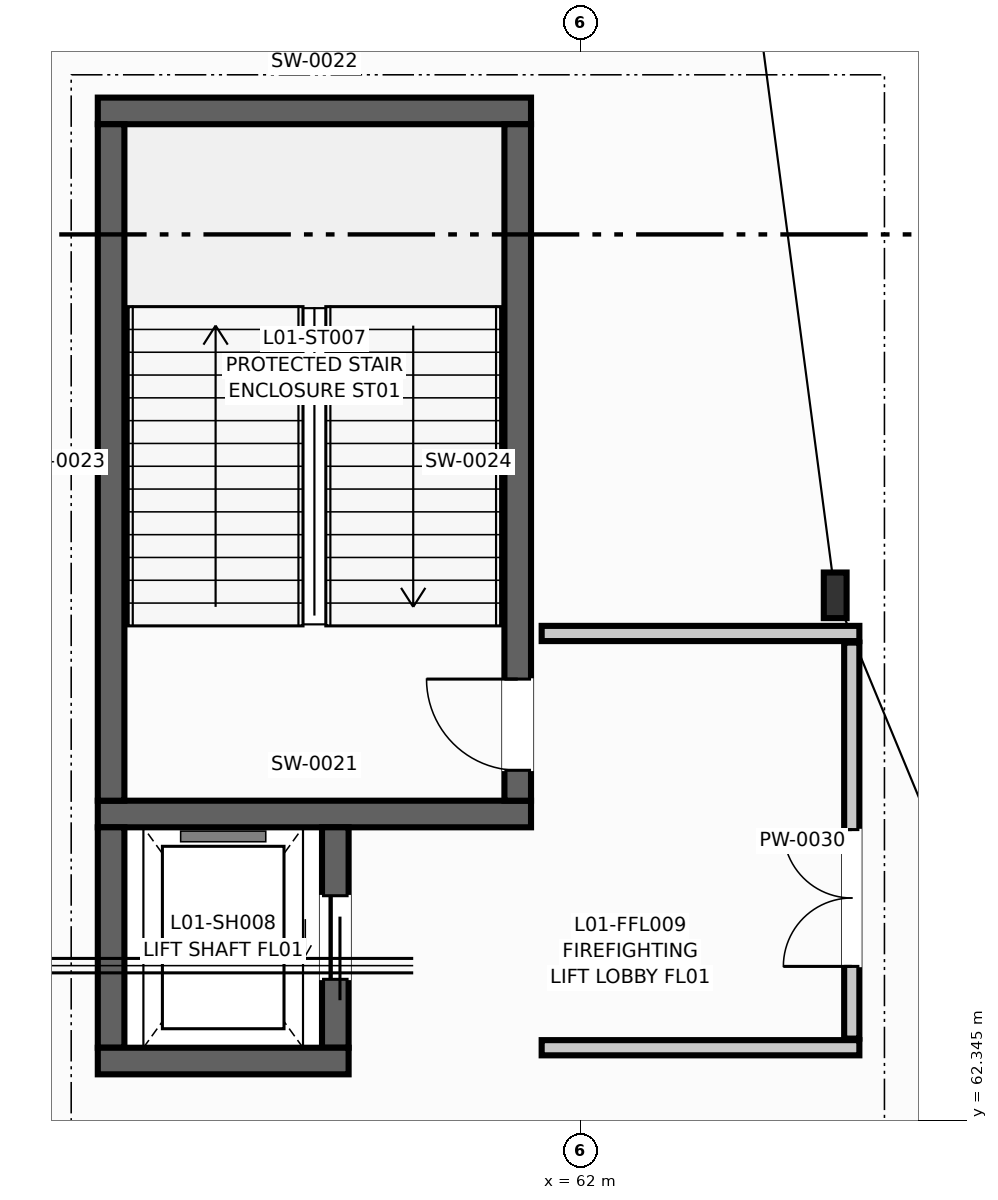
"""IFC4 building model, lengths in metres.
Left out: names, types, materials, properties, quantities, classifications, styles, units other than length and angle.
Written with IfcOpenShell. Run it as: python <this file> out.ifc"""

import sys

from ifc_helpers import new_model, si_unit, direction, frame, frame_2d, origin, origin_2d, place, context, subcontext, project, spatial, rectangle, i_section, extrude, element, fill, save


model = new_model("IFC4")
c1 = context("Model", 3, precision=1e-05, world=origin(), true_north=direction((0.0, 1.0)))
c2 = subcontext(c1, "Body", "Model", "MODEL_VIEW")
j1 = project(units=[si_unit("LENGTHUNIT", "METRE"), si_unit("PLANEANGLEUNIT", "RADIAN")], contexts=[c1])
p1 = place(None, origin())
s1 = spatial("IfcSite", under=j1, at=p1, CompositionType="ELEMENT")
p2 = place(p1, origin())
s2 = spatial("IfcBuilding", under=s1, at=p2, CompositionType="ELEMENT")
p3 = place(p2, frame((0.0, 0.0, 4.5)))
s3 = spatial("IfcBuildingStorey", under=s2, at=p3, CompositionType="ELEMENT", Elevation=4.5)
p4 = place(p3, frame((65.352, 69.252, 0.0), z_axis=(0.0, 0.0, 1.0), x_axis=(1.0, 0.0, 0.0)))
e1 = element("IfcColumn", 1, at=p4, inside=s3, PredefinedType="COLUMN", context=c2, shape_type="SweptSolid", body=[
    extrude(i_section(OverallWidth=0.3, OverallDepth=0.6, WebThickness=0.015, FlangeThickness=0.03, at=origin_2d()), origin(), (0.0, 0.0, 1.0), 4.5),
])
p5 = place(p3, frame((51.686, 65.457, 0.0), z_axis=(0.0, 0.0, 1.0), x_axis=(0.382625334652, -0.923903595232, 0.0)))
e2 = element("IfcWall", 2, at=p5, inside=s3, PredefinedType="SOLIDWALL", context=c2, shape_type="SweptSolid", body=[
    extrude(rectangle(XDim=12.271, YDim=0.28, at=frame_2d((6.135, 0.0))), origin(), (0.0, 0.0, 1.0), 3.1),
])
p6 = place(p5, frame((5.235, 0.0, 0.0)))
e3 = element("IfcOpeningElement", 3, at=p6, cuts=e2, PredefinedType="OPENING", context=c2, shape_type="SweptSolid", body=[
    extrude(rectangle(XDim=1.8, YDim=2.35, at=frame_2d((0.9, 1.175))), frame((0.0, 0.15, 0.0), z_axis=(0.0, -1.0, 0.0), x_axis=(1.0, 0.0, 0.0)), (0.0, 0.0, 1.0), 0.3),
])
for number, where, z_axis, x_axis in (
    (4, (55.65, 66.375, 0.0), (0.0, 0.0, 1.0), (1.0, 0.0, 0.0)),
    (5, (55.65, 75.625, 0.0), (0.0, 0.0, 1.0), (1.0, 0.0, 0.0)),
):
    element("IfcWall", number, at=place(p3, frame(where, z_axis=z_axis, x_axis=x_axis)), inside=s3, PredefinedType="SHEAR", context=c2, shape_type="SweptSolid", body=[
        extrude(rectangle(XDim=5.7, YDim=0.35, at=frame_2d((2.85, 0.0))), origin(), (0.0, 0.0, 1.0), 4.25),
    ])
p7 = place(p3, frame((55.825, 66.55, 0.0), z_axis=(0.0, 0.0, 1.0), x_axis=(0.0, 1.0, 0.0)))
e6 = element("IfcWall", 6, at=p7, inside=s3, PredefinedType="SHEAR", context=c2, shape_type="SweptSolid", body=[
    extrude(rectangle(XDim=8.9, YDim=0.35, at=frame_2d((4.45, 0.0))), origin(), (0.0, 0.0, 1.0), 4.25),
])
p8 = place(p3, frame((61.175, 66.55, 0.0), z_axis=(0.0, 0.0, 1.0), x_axis=(0.0, 1.0, 0.0)))
e7 = element("IfcWall", 7, at=p8, inside=s3, PredefinedType="SHEAR", context=c2, shape_type="SweptSolid", body=[
    extrude(rectangle(XDim=8.9, YDim=0.35, at=frame_2d((4.45, 0.0))), origin(), (0.0, 0.0, 1.0), 4.25),
])
p9 = place(p8, frame((0.4, 0.0, 0.0)))
e8 = element("IfcOpeningElement", 8, at=p9, cuts=e7, PredefinedType="OPENING", context=c2, shape_type="SweptSolid", body=[
    extrude(rectangle(XDim=1.2, YDim=2.2, at=frame_2d((0.6, 1.1))), frame((0.0, 0.185, 0.0), z_axis=(0.0, -1.0, 0.0), x_axis=(1.0, 0.0, 0.0)), (0.0, 0.0, 1.0), 0.37),
])
p10 = place(p3, frame((55.825, 63.3, 0.0), z_axis=(0.0, 0.0, 1.0), x_axis=(0.0, 1.0, 0.0)))
e9 = element("IfcWall", 9, at=p10, inside=s3, PredefinedType="SHEAR", context=c2, shape_type="SweptSolid", body=[
    extrude(rectangle(XDim=2.9, YDim=0.35, at=frame_2d((1.45, 0.0))), origin(), (0.0, 0.0, 1.0), 4.25),
])
p11 = place(p3, frame((58.775, 63.3, 0.0), z_axis=(0.0, 0.0, 1.0), x_axis=(0.0, 1.0, 0.0)))
e10 = element("IfcWall", 10, at=p11, inside=s3, PredefinedType="SHEAR", context=c2, shape_type="SweptSolid", body=[
    extrude(rectangle(XDim=2.9, YDim=0.35, at=frame_2d((1.45, 0.0))), origin(), (0.0, 0.0, 1.0), 4.25),
])
p12 = place(p11, frame((0.9, 0.0, 0.0)))
e11 = element("IfcOpeningElement", 11, at=p12, cuts=e10, PredefinedType="OPENING", context=c2, shape_type="SweptSolid", body=[
    extrude(rectangle(XDim=1.1, YDim=2.2, at=frame_2d((0.55, 1.1))), frame((0.0, 0.185, 0.0), z_axis=(0.0, -1.0, 0.0), x_axis=(1.0, 0.0, 0.0)), (0.0, 0.0, 1.0), 0.37),
])
p13 = place(p3, frame((55.65, 63.125, 0.0), z_axis=(0.0, 0.0, 1.0), x_axis=(1.0, 0.0, 0.0)))
e12 = element("IfcWall", 12, at=p13, inside=s3, PredefinedType="SHEAR", context=c2, shape_type="SweptSolid", body=[
    extrude(rectangle(XDim=3.3, YDim=0.35, at=frame_2d((1.65, 0.0))), origin(), (0.0, 0.0, 1.0), 4.25),
])
for number, where, z_axis, x_axis in (
    (13, (61.49, 63.3, 0.0), (0.0, 0.0, 1.0), (1.0, 0.0, 0.0)),
    (14, (61.49, 68.75, 0.0), (0.0, 0.0, 1.0), (1.0, 0.0, 0.0)),
):
    element("IfcWall", number, at=place(p3, frame(where, z_axis=z_axis, x_axis=x_axis)), inside=s3, PredefinedType="PARTITIONING", context=c2, shape_type="SweptSolid", body=[
        extrude(rectangle(XDim=4.18, YDim=0.2, at=frame_2d((2.09, 0.0))), origin(), (0.0, 0.0, 1.0), 3.22),
    ])
p14 = place(p3, frame((65.57, 63.42, 0.0), z_axis=(0.0, 0.0, 1.0), x_axis=(0.0, 1.0, 0.0)))
e15 = element("IfcWall", 15, at=p14, inside=s3, PredefinedType="PARTITIONING", context=c2, shape_type="SweptSolid", body=[
    extrude(rectangle(XDim=5.21, YDim=0.2, at=frame_2d((2.605, 0.0))), origin(), (0.0, 0.0, 1.0), 3.22),
])
p15 = place(p14, frame((0.95, 0.0, 0.0)))
e16 = element("IfcOpeningElement", 16, at=p15, cuts=e15, PredefinedType="OPENING", context=c2, shape_type="SweptSolid", body=[
    extrude(rectangle(XDim=1.8, YDim=2.2, at=frame_2d((0.9, 1.1))), frame((0.0, 0.11, 0.0), z_axis=(0.0, -1.0, 0.0), x_axis=(1.0, 0.0, 0.0)), (0.0, 0.0, 1.0), 0.22),
])
p16 = place(p9, origin())
e17 = element("IfcDoor", 17, at=p16, inside=s3, OperationType="SINGLE_SWING_RIGHT", PredefinedType="DOOR", context=c2, shape_type="SweptSolid", body=[
    extrude(rectangle(XDim=1.2, YDim=2.2, at=frame_2d((0.6, 1.1))), frame((0.0, 0.025, 0.0), z_axis=(0.0, -1.0, 0.0), x_axis=(1.0, 0.0, 0.0)), (0.0, 0.0, 1.0), 0.05),
])
fill(e8, e17)
p17 = place(p12, origin())
e18 = element("IfcDoor", 18, at=p17, inside=s3, OperationType="SLIDING_TO_LEFT", PredefinedType="DOOR", context=c2, shape_type="SweptSolid", body=[
    extrude(rectangle(XDim=1.1, YDim=2.2, at=frame_2d((0.55, 1.1))), frame((0.0, 0.025, 0.0), z_axis=(0.0, -1.0, 0.0), x_axis=(1.0, 0.0, 0.0)), (0.0, 0.0, 1.0), 0.05),
])
fill(e11, e18)
p18 = place(p15, origin())
e19 = element("IfcDoor", 19, at=p18, inside=s3, OperationType="DOUBLE_DOOR_SINGLE_SWING", PredefinedType="DOOR", context=c2, shape_type="SweptSolid", body=[
    extrude(rectangle(XDim=1.8, YDim=2.2, at=frame_2d((0.9, 1.1))), frame((0.0, 0.025, 0.0), z_axis=(0.0, -1.0, 0.0), x_axis=(1.0, 0.0, 0.0)), (0.0, 0.0, 1.0), 0.05),
])
fill(e16, e19)
save(model, sys.argv[1])
